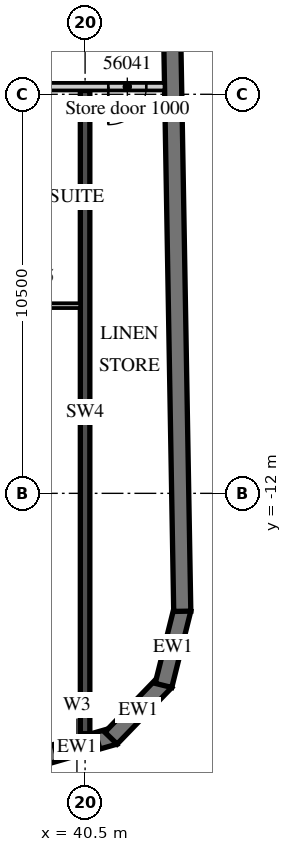
"""IFC4 building model, lengths in metres.
Left out: names, types, materials, properties, quantities, classifications, styles, units other than length and angle.
Written with IfcOpenShell. Run it as: python <this file> out.ifc"""

import sys

from ifc_helpers import new_model, si_unit, direction, frame, frame_2d, origin, place, context, subcontext, project, spatial, polyline, rectangle, outline, extrude, element, fill, save


model = new_model("IFC4")
c1 = context("Model", 3, precision=1e-05, world=origin(), true_north=direction((0.0, 1.0)))
c2 = subcontext(c1, "Body", "Model", "MODEL_VIEW")
j1 = project(units=[si_unit("LENGTHUNIT", "METRE"), si_unit("PLANEANGLEUNIT", "RADIAN")], contexts=[c1])
p1 = place(None, origin())
s1 = spatial("IfcSite", under=j1, at=p1, CompositionType="ELEMENT")
p2 = place(p1, origin())
s2 = spatial("IfcBuilding", under=s1, at=p2, CompositionType="ELEMENT")
p3 = place(p2, frame((0.0, 0.0, 230.9)))
s3 = spatial("IfcBuildingStorey", under=s2, at=p3, CompositionType="ELEMENT", Elevation=230.9)
p4 = place(p3, frame((40.5, -18.325, 0.0), z_axis=(0.0, 0.0, 1.0), x_axis=(0.0, 1.0, 0.0)))
e1 = element("IfcWall", 1, at=p4, inside=s3, PredefinedType="SHEAR", context=c2, shape_type="SweptSolid", body=[
    extrude(rectangle(XDim=16.925, YDim=0.25, at=frame_2d((8.463, 0.0))), origin(), (0.0, 0.0, 1.0), 3.3),
])
p5 = place(p3, frame((39.29, -18.952, 0.0), z_axis=(0.0, 0.0, 1.0), x_axis=(0.961247584925, 0.275686562016, 0.0)))
e2 = element("IfcWall", 2, at=p5, inside=s3, PredefinedType="SOLIDWALL", context=c2, shape_type="SweptSolid", body=[
    extrude(outline(polyline([(0.0, -0.225), (2.071, -0.225), (1.95, 0.225), (0.121, 0.225), (0.0, -0.225)])), origin(), (0.0, 0.0, 1.0), 3.02),
])
p6 = place(p5, frame((0.435, 0.0, 0.45)))
e3 = element("IfcOpeningElement", 3, at=p6, cuts=e2, PredefinedType="OPENING", context=c2, shape_type="SweptSolid", body=[
    extrude(rectangle(XDim=1.2, YDim=2.25, at=frame_2d((0.6, 1.125))), frame((0.0, 0.235, 0.0), z_axis=(0.0, -1.0, 0.0), x_axis=(1.0, 0.0, 0.0)), (0.0, 0.0, 1.0), 0.47),
])
p7 = place(p3, frame((41.181, -18.442, 0.0), z_axis=(0.0, 0.0, 1.0), x_axis=(0.694678672846, 0.719320193998, 0.0)))
e4 = element("IfcWall", 4, at=p7, inside=s3, PredefinedType="SOLIDWALL", context=c2, shape_type="SweptSolid", body=[
    extrude(outline(polyline([(0.0, -0.225), (2.071, -0.225), (1.95, 0.225), (0.121, 0.225), (0.0, -0.225)])), origin(), (0.0, 0.0, 1.0), 3.02),
])
p8 = place(p3, frame((42.563, -17.054, 0.0), z_axis=(0.0, 0.0, 1.0), x_axis=(0.241841950319, 0.970315655375, 0.0)))
e5 = element("IfcWall", 5, at=p8, inside=s3, PredefinedType="SOLIDWALL", context=c2, shape_type="SweptSolid", body=[
    extrude(outline(polyline([(0.0, -0.225), (2.071, -0.225), (1.95, 0.225), (0.121, 0.225), (0.0, -0.225)])), origin(), (0.0, 0.0, 1.0), 3.02),
])
p9 = place(p3, frame((43.057, -15.103, 0.0), z_axis=(0.0, 0.0, 1.0), x_axis=(-0.017452408953, 0.999847695112, 0.0)))
e6 = element("IfcWall", 6, at=p9, inside=s3, PredefinedType="SOLIDWALL", context=c2, shape_type="SweptSolid", body=[
    extrude(rectangle(XDim=33.0, YDim=0.45, at=frame_2d((16.5, 0.0))), origin(), (0.0, 0.0, 1.0), 3.02),
])
p10 = place(p3, frame((13.5, -1.3, 0.0), z_axis=(0.0, 0.0, 1.0), x_axis=(1.0, 0.0, 0.0)))
e7 = element("IfcWall", 7, at=p10, inside=s3, PredefinedType="PARTITIONING", context=c2, shape_type="SweptSolid", body=[
    extrude(rectangle(XDim=29.091, YDim=0.2, at=frame_2d((14.545, 0.0))), origin(), (0.0, 0.0, 1.0), 3.02),
])
p11 = place(p10, frame((0.575, 0.0, 0.0)))
e8 = element("IfcOpeningElement", 8, at=p11, cuts=e7, PredefinedType="OPENING", context=c2, shape_type="SweptSolid", body=[
    extrude(rectangle(XDim=1.0, YDim=2.1, at=frame_2d((0.5, 1.05))), frame((0.0, 0.11, 0.0), z_axis=(0.0, -1.0, 0.0), x_axis=(1.0, 0.0, 0.0)), (0.0, 0.0, 1.0), 0.22),
])
p12 = place(p10, frame((5.075, 0.0, 0.0)))
e9 = element("IfcOpeningElement", 9, at=p12, cuts=e7, PredefinedType="OPENING", context=c2, shape_type="SweptSolid", body=[
    extrude(rectangle(XDim=1.0, YDim=2.1, at=frame_2d((0.5, 1.05))), frame((0.0, 0.11, 0.0), z_axis=(0.0, -1.0, 0.0), x_axis=(1.0, 0.0, 0.0)), (0.0, 0.0, 1.0), 0.22),
])
p13 = place(p10, frame((9.55, 0.0, 0.0)))
e10 = element("IfcOpeningElement", 10, at=p13, cuts=e7, PredefinedType="OPENING", context=c2, shape_type="SweptSolid", body=[
    extrude(rectangle(XDim=1.0, YDim=2.1, at=frame_2d((0.5, 1.05))), frame((0.0, 0.11, 0.0), z_axis=(0.0, -1.0, 0.0), x_axis=(1.0, 0.0, 0.0)), (0.0, 0.0, 1.0), 0.22),
])
p14 = place(p10, frame((18.862, 0.0, 0.0)))
e11 = element("IfcOpeningElement", 11, at=p14, cuts=e7, PredefinedType="OPENING", context=c2, shape_type="SweptSolid", body=[
    extrude(rectangle(XDim=1.2, YDim=2.1, at=frame_2d((0.6, 1.05))), frame((0.0, 0.11, 0.0), z_axis=(0.0, -1.0, 0.0), x_axis=(1.0, 0.0, 0.0)), (0.0, 0.0, 1.0), 0.22),
])
p15 = place(p10, frame((23.075, 0.0, 0.0)))
e12 = element("IfcOpeningElement", 12, at=p15, cuts=e7, PredefinedType="OPENING", context=c2, shape_type="SweptSolid", body=[
    extrude(rectangle(XDim=1.0, YDim=2.1, at=frame_2d((0.5, 1.05))), frame((0.0, 0.11, 0.0), z_axis=(0.0, -1.0, 0.0), x_axis=(1.0, 0.0, 0.0)), (0.0, 0.0, 1.0), 0.22),
])
p16 = place(p10, frame((27.611, 0.0, 0.0)))
e13 = element("IfcOpeningElement", 13, at=p16, cuts=e7, PredefinedType="OPENING", context=c2, shape_type="SweptSolid", body=[
    extrude(rectangle(XDim=1.0, YDim=2.4, at=frame_2d((0.5, 1.2))), frame((0.0, 0.11, 0.0), z_axis=(0.0, -1.0, 0.0), x_axis=(1.0, 0.0, 0.0)), (0.0, 0.0, 1.0), 0.22),
])
p17 = place(p3, frame((38.15, -7.062, 0.0), z_axis=(0.0, 0.0, 1.0), x_axis=(1.0, 0.0, 0.0)))
e14 = element("IfcWall", 14, at=p17, inside=s3, PredefinedType="PARTITIONING", context=c2, shape_type="SweptSolid", body=[
    extrude(rectangle(XDim=2.225, YDim=0.125, at=frame_2d((1.113, 0.0))), origin(), (0.0, 0.0, 1.0), 3.02),
])
p18 = place(p6, origin())
e15 = element("IfcWindow", 15, at=p18, inside=s3, PartitioningType="SINGLE_PANEL", PredefinedType="WINDOW", context=c2, shape_type="SweptSolid", body=[
    extrude(rectangle(XDim=1.2, YDim=2.25, at=frame_2d((0.6, 1.125))), frame((0.0, 0.09, 0.0), z_axis=(0.0, -1.0, 0.0), x_axis=(1.0, 0.0, 0.0)), (0.0, 0.0, 1.0), 0.06),
])
fill(e3, e15)
p19 = place(p16, origin())
e16 = element("IfcDoor", 16, at=p19, inside=s3, OperationType="SINGLE_SWING_LEFT", PredefinedType="DOOR", context=c2, shape_type="SweptSolid", body=[
    extrude(rectangle(XDim=1.0, YDim=2.4, at=frame_2d((0.5, 1.2))), frame((0.0, 0.025, 0.0), z_axis=(0.0, -1.0, 0.0), x_axis=(1.0, 0.0, 0.0)), (0.0, 0.0, 1.0), 0.05),
])
fill(e13, e16)
save(model, sys.argv[1])
